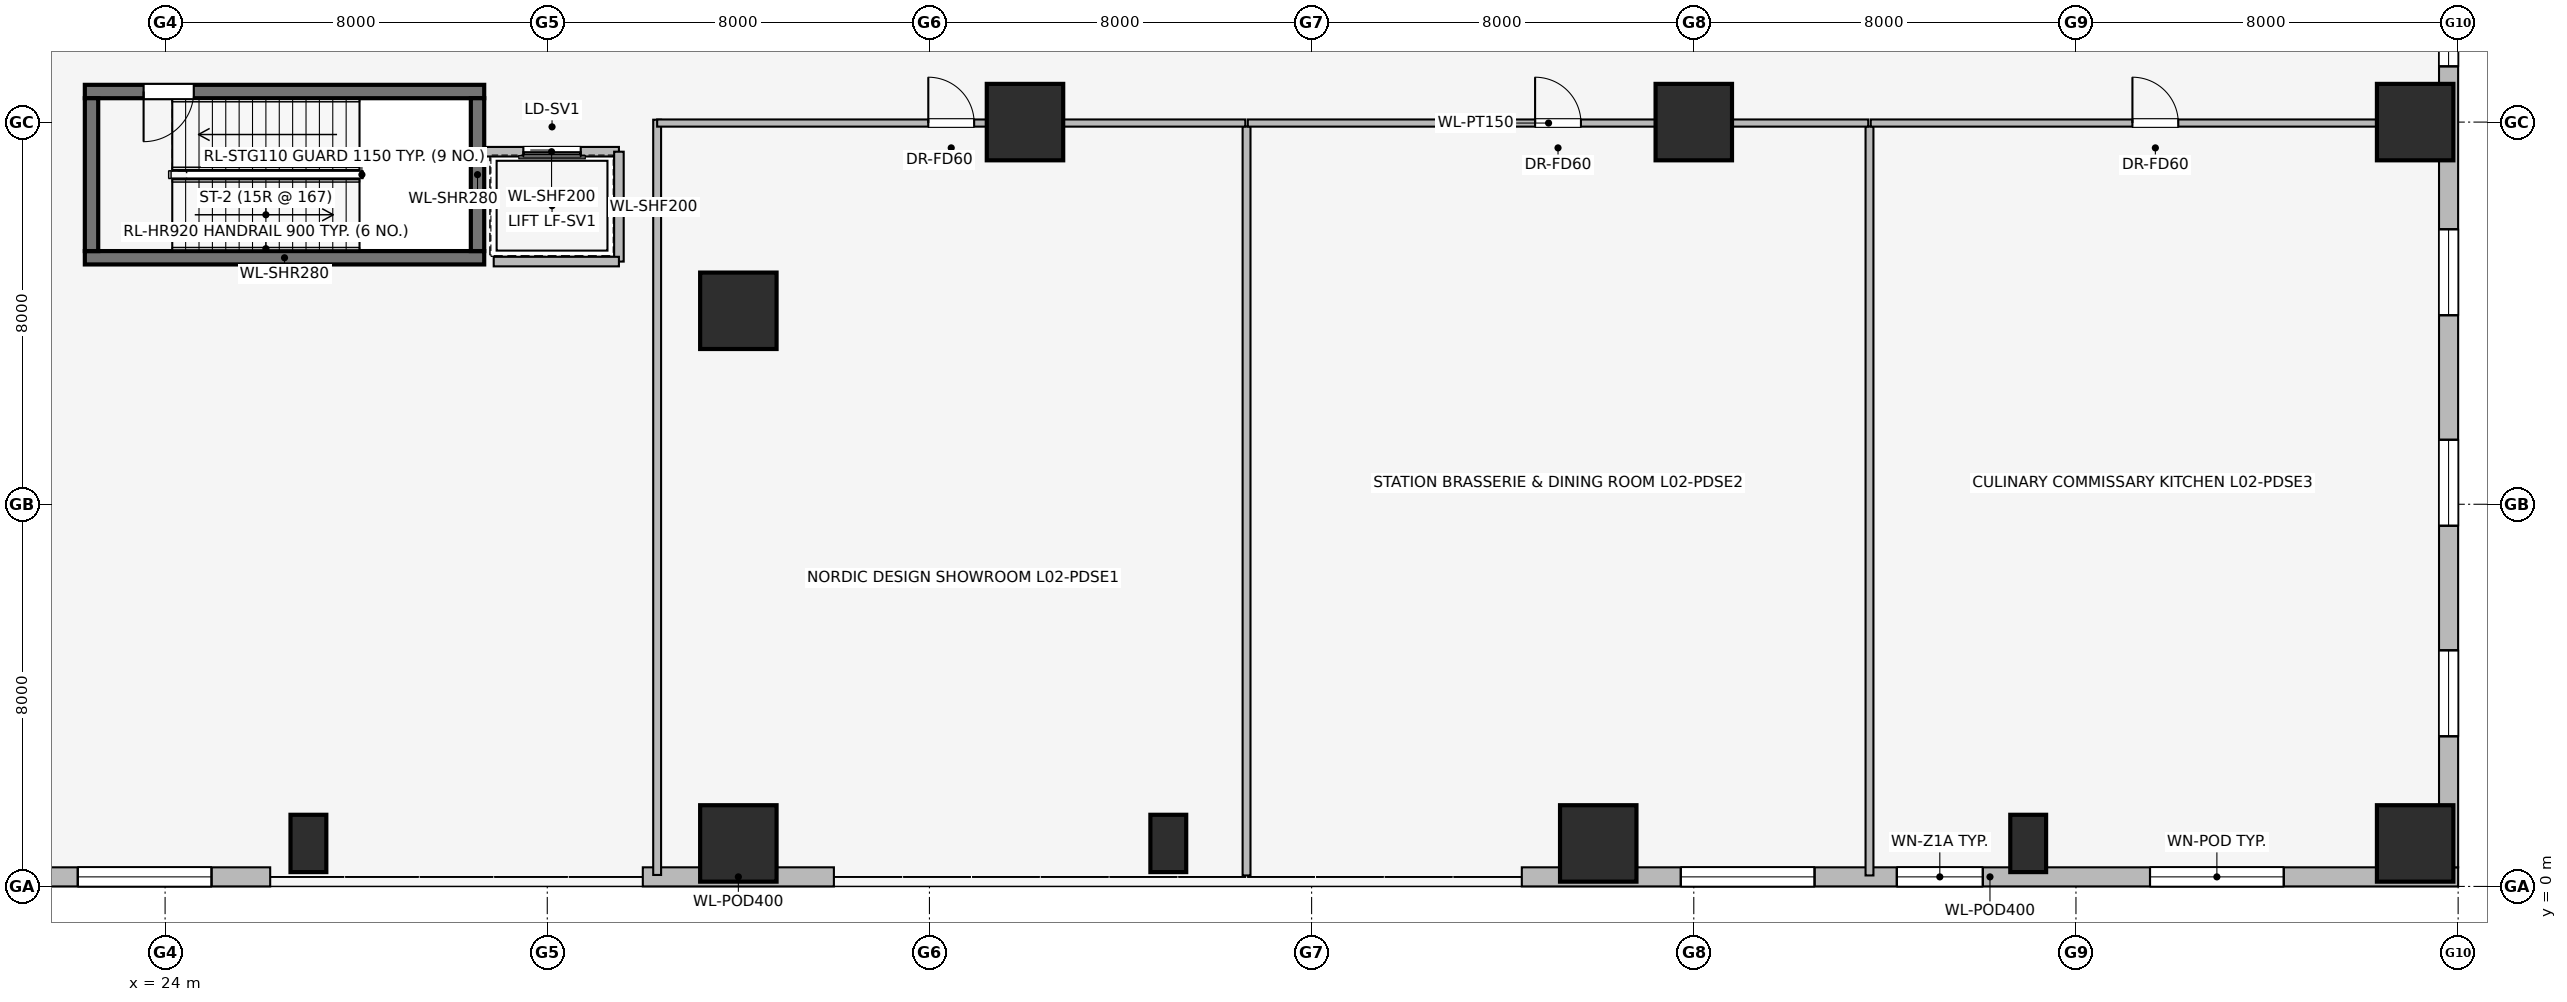
"""IFC4 building model, lengths in metres.
Left out: names, types, materials, properties, quantities, classifications, styles, units other than length and angle.
Written with IfcOpenShell. Run it as: python <this file> out.ifc"""

import sys

from ifc_helpers import new_model, si_unit, direction, frame, frame_2d, origin, origin_2d, place, context, subcontext, project, spatial, rectangle, extrude, element, fill, save


model = new_model("IFC4")
c1 = context("Model", 3, precision=1e-05, world=origin(), true_north=direction((0.0, 1.0)))
c2 = subcontext(c1, "Body", "Model", "MODEL_VIEW")
j1 = project(units=[si_unit("LENGTHUNIT", "METRE"), si_unit("PLANEANGLEUNIT", "RADIAN")], contexts=[c1])
p1 = place(None, origin())
s1 = spatial("IfcSite", under=j1, at=p1, CompositionType="ELEMENT")
p2 = place(p1, origin())
s2 = spatial("IfcBuilding", under=s1, at=p2, CompositionType="ELEMENT")
p3 = place(p2, frame((0.0, 0.0, 6.0)))
s3 = spatial("IfcBuildingStorey", under=s2, at=p3, CompositionType="ELEMENT", Elevation=6.0)
p4 = place(p3, frame((22.32, 13.16, 0.0), z_axis=(0.0, 0.0, 1.0), x_axis=(1.0, 0.0, 0.0)))
e1 = element("IfcWall", 1, at=p4, inside=s3, PredefinedType="SHEAR", context=c2, shape_type="SweptSolid", body=[
    extrude(rectangle(XDim=8.36, YDim=0.28, at=frame_2d((4.18, 0.0))), origin(), (0.0, 0.0, 1.0), 5.0),
])
p5 = place(p3, frame((30.68, 16.64, 0.0), z_axis=(0.0, 0.0, 1.0), x_axis=(-1.0, 0.0, 0.0)))
e2 = element("IfcWall", 2, at=p5, inside=s3, PredefinedType="SHEAR", context=c2, shape_type="SweptSolid", body=[
    extrude(rectangle(XDim=8.36, YDim=0.28, at=frame_2d((4.18, 0.0))), origin(), (0.0, 0.0, 1.0), 5.0),
])
p6 = place(p5, frame((6.08, 0.0, 0.0)))
e3 = element("IfcOpeningElement", 3, at=p6, cuts=e2, PredefinedType="OPENING", context=c2, shape_type="SweptSolid", body=[
    extrude(rectangle(XDim=1.05, YDim=2.0, at=frame_2d((0.525, 1.0))), frame((0.0, 0.15, 0.0), z_axis=(0.0, -1.0, 0.0), x_axis=(1.0, 0.0, 0.0)), (0.0, 0.0, 1.0), 0.3),
])
for number, where, z_axis, x_axis in (
    (4, (22.46, 16.5, 0.0), (0.0, 0.0, 1.0), (0.0, -1.0, 0.0)),
    (5, (30.54, 13.3, 0.0), (0.0, 0.0, 1.0), (0.0, 1.0, 0.0)),
):
    element("IfcWall", number, at=place(p3, frame(where, z_axis=z_axis, x_axis=x_axis)), inside=s3, PredefinedType="SHEAR", context=c2, shape_type="SweptSolid", body=[
        extrude(rectangle(XDim=3.2, YDim=0.28, at=frame_2d((1.6, 0.0))), origin(), (0.0, 0.0, 1.0), 5.0),
    ])
for number, where, z_axis, x_axis in (
    (6, (71.1, 0.9, 0.0), (0.0, 0.0, 1.0), (1.0, 0.0, 0.0)),
    (7, (36.0, 0.9, 0.0), (0.0, 0.0, 1.0), (1.0, 0.0, 0.0)),
    (8, (54.0, 0.9, 0.0), (0.0, 0.0, 1.0), (1.0, 0.0, 0.0)),
    (9, (71.1, 16.0, 0.0), (0.0, 0.0, 1.0), (1.0, 0.0, 0.0)),
    (10, (42.0, 16.0, 0.0), (0.0, 0.0, 1.0), (1.0, 0.0, 0.0)),
    (11, (56.0, 16.0, 0.0), (0.0, 0.0, 1.0), (1.0, 0.0, 0.0)),
    (12, (36.0, 12.05, 0.0), (0.0, 0.0, 1.0), (1.0, 0.0, 0.0)),
):
    element("IfcColumn", number, at=place(p3, frame(where, z_axis=z_axis, x_axis=x_axis)), inside=s3, PredefinedType="COLUMN", context=c2, shape_type="SweptSolid", body=[
        extrude(rectangle(XDim=1.6, YDim=1.6, at=origin_2d()), origin(), (0.0, 0.0, 1.0), 5.0),
    ])
for number, where, z_axis, x_axis in (
    (13, (27.0, 0.9, 0.0), (0.0, 0.0, 1.0), (1.0, 0.0, 0.0)),
    (14, (45.0, 0.9, 0.0), (0.0, 0.0, 1.0), (1.0, 0.0, 0.0)),
    (15, (63.0, 0.9, 0.0), (0.0, 0.0, 1.0), (1.0, 0.0, 0.0)),
):
    element("IfcColumn", number, at=place(p3, frame(where, z_axis=z_axis, x_axis=x_axis)), inside=s3, PredefinedType="PILASTER", context=c2, shape_type="SweptSolid", body=[
        extrude(rectangle(XDim=0.75, YDim=1.2, at=origin_2d()), origin(), (0.0, 0.0, 1.0), 5.0),
    ])
p7 = place(p3, frame((72.0, 0.2, 0.0), z_axis=(0.0, 0.0, 1.0), x_axis=(-1.0, 0.0, 0.0)))
e16 = element("IfcWall", 16, at=p7, inside=s3, PredefinedType="STANDARD", context=c2, shape_type="SweptSolid", body=[
    extrude(rectangle(XDim=19.6, YDim=0.4, at=frame_2d((9.8, 0.0))), origin(), (0.0, 0.0, 1.0), 4.69),
])
p8 = place(p7, frame((3.65, 0.0, 0.75)))
e17 = element("IfcOpeningElement", 17, at=p8, cuts=e16, PredefinedType="OPENING", context=c2, shape_type="SweptSolid", body=[
    extrude(rectangle(XDim=2.8, YDim=1.8, at=frame_2d((1.4, 0.9))), frame((0.0, 0.21, 0.0), z_axis=(0.0, -1.0, 0.0), x_axis=(1.0, 0.0, 0.0)), (0.0, 0.0, 1.0), 0.42),
])
p9 = place(p7, frame((9.95, 0.0, 0.75)))
e18 = element("IfcOpeningElement", 18, at=p9, cuts=e16, PredefinedType="OPENING", context=c2, shape_type="SweptSolid", body=[
    extrude(rectangle(XDim=1.8, YDim=1.5, at=frame_2d((0.9, 0.75))), frame((0.0, 0.21, 0.0), z_axis=(0.0, -1.0, 0.0), x_axis=(1.0, 0.0, 0.0)), (0.0, 0.0, 1.0), 0.42),
])
p10 = place(p7, frame((13.472, 0.0, 0.75)))
e19 = element("IfcOpeningElement", 19, at=p10, cuts=e16, PredefinedType="OPENING", context=c2, shape_type="SweptSolid", body=[
    extrude(rectangle(XDim=2.8, YDim=1.8, at=frame_2d((1.4, 0.9))), frame((0.0, 0.21, 0.0), z_axis=(0.0, -1.0, 0.0), x_axis=(1.0, 0.0, 0.0)), (0.0, 0.0, 1.0), 0.42),
])
p11 = place(p3, frame((38.0, 0.2, 0.0), z_axis=(0.0, 0.0, 1.0), x_axis=(-1.0, 0.0, 0.0)))
e20 = element("IfcWall", 20, at=p11, inside=s3, PredefinedType="STANDARD", context=c2, shape_type="SweptSolid", body=[
    extrude(rectangle(XDim=4.0, YDim=0.4, at=frame_2d((2.0, 0.0))), origin(), (0.0, 0.0, 1.0), 4.69),
])
p12 = place(p3, frame((26.2, 0.2, 0.0), z_axis=(0.0, 0.0, 1.0), x_axis=(-1.0, 0.0, 0.0)))
e21 = element("IfcWall", 21, at=p12, inside=s3, PredefinedType="STANDARD", context=c2, shape_type="SweptSolid", body=[
    extrude(rectangle(XDim=26.2, YDim=0.4, at=frame_2d((13.1, 0.0))), origin(), (0.0, 0.0, 1.0), 4.69),
])
p13 = place(p12, frame((1.228, 0.0, 0.75)))
e22 = element("IfcOpeningElement", 22, at=p13, cuts=e21, PredefinedType="OPENING", context=c2, shape_type="SweptSolid", body=[
    extrude(rectangle(XDim=2.8, YDim=1.8, at=frame_2d((1.4, 0.9))), frame((0.0, 0.21, 0.0), z_axis=(0.0, -1.0, 0.0), x_axis=(1.0, 0.0, 0.0)), (0.0, 0.0, 1.0), 0.42),
])
p14 = place(p12, frame((5.383, 0.0, 0.75)))
e23 = element("IfcOpeningElement", 23, at=p14, cuts=e21, PredefinedType="OPENING", context=c2, shape_type="SweptSolid", body=[
    extrude(rectangle(XDim=2.8, YDim=1.8, at=frame_2d((1.4, 0.9))), frame((0.0, 0.21, 0.0), z_axis=(0.0, -1.0, 0.0), x_axis=(1.0, 0.0, 0.0)), (0.0, 0.0, 1.0), 0.42),
])
p15 = place(p12, frame((11.27, 0.0, 0.75)))
e24 = element("IfcOpeningElement", 24, at=p15, cuts=e21, PredefinedType="OPENING", context=c2, shape_type="SweptSolid", body=[
    extrude(rectangle(XDim=1.8, YDim=1.5, at=frame_2d((0.9, 0.75))), frame((0.0, 0.21, 0.0), z_axis=(0.0, -1.0, 0.0), x_axis=(1.0, 0.0, 0.0)), (0.0, 0.0, 1.0), 0.42),
])
p16 = place(p12, frame((14.13, 0.0, 0.75)))
e25 = element("IfcOpeningElement", 25, at=p16, cuts=e21, PredefinedType="OPENING", context=c2, shape_type="SweptSolid", body=[
    extrude(rectangle(XDim=1.8, YDim=1.5, at=frame_2d((0.9, 0.75))), frame((0.0, 0.21, 0.0), z_axis=(0.0, -1.0, 0.0), x_axis=(1.0, 0.0, 0.0)), (0.0, 0.0, 1.0), 0.42),
])
p17 = place(p12, frame((19.75, 0.0, 0.75)))
e26 = element("IfcOpeningElement", 26, at=p17, cuts=e21, PredefinedType="OPENING", context=c2, shape_type="SweptSolid", body=[
    extrude(rectangle(XDim=2.8, YDim=1.8, at=frame_2d((1.4, 0.9))), frame((0.0, 0.21, 0.0), z_axis=(0.0, -1.0, 0.0), x_axis=(1.0, 0.0, 0.0)), (0.0, 0.0, 1.0), 0.42),
])
p18 = place(p3, frame((71.8, 24.0, 0.0), z_axis=(0.0, 0.0, 1.0), x_axis=(0.0, -1.0, 0.0)))
e27 = element("IfcWall", 27, at=p18, inside=s3, PredefinedType="STANDARD", context=c2, shape_type="SweptSolid", body=[
    extrude(rectangle(XDim=23.6, YDim=0.4, at=frame_2d((11.8, 0.0))), origin(), (0.0, 0.0, 1.0), 4.69),
])
p19 = place(p18, frame((0.778, 0.0, 0.75)))
e28 = element("IfcOpeningElement", 28, at=p19, cuts=e27, PredefinedType="OPENING", context=c2, shape_type="SweptSolid", body=[
    extrude(rectangle(XDim=2.8, YDim=1.8, at=frame_2d((1.4, 0.9))), frame((0.0, 0.21, 0.0), z_axis=(0.0, -1.0, 0.0), x_axis=(1.0, 0.0, 0.0)), (0.0, 0.0, 1.0), 0.42),
])
p20 = place(p18, frame((4.033, 0.0, 0.75)))
e29 = element("IfcOpeningElement", 29, at=p20, cuts=e27, PredefinedType="OPENING", context=c2, shape_type="SweptSolid", body=[
    extrude(rectangle(XDim=2.8, YDim=1.8, at=frame_2d((1.4, 0.9))), frame((0.0, 0.21, 0.0), z_axis=(0.0, -1.0, 0.0), x_axis=(1.0, 0.0, 0.0)), (0.0, 0.0, 1.0), 0.42),
])
p21 = place(p18, frame((10.243, 0.0, 0.75)))
e30 = element("IfcOpeningElement", 30, at=p21, cuts=e27, PredefinedType="OPENING", context=c2, shape_type="SweptSolid", body=[
    extrude(rectangle(XDim=1.8, YDim=1.5, at=frame_2d((0.9, 0.75))), frame((0.0, 0.21, 0.0), z_axis=(0.0, -1.0, 0.0), x_axis=(1.0, 0.0, 0.0)), (0.0, 0.0, 1.0), 0.42),
])
p22 = place(p18, frame((14.65, 0.0, 0.75)))
e31 = element("IfcOpeningElement", 31, at=p22, cuts=e27, PredefinedType="OPENING", context=c2, shape_type="SweptSolid", body=[
    extrude(rectangle(XDim=1.8, YDim=1.5, at=frame_2d((0.9, 0.75))), frame((0.0, 0.21, 0.0), z_axis=(0.0, -1.0, 0.0), x_axis=(1.0, 0.0, 0.0)), (0.0, 0.0, 1.0), 0.42),
])
p23 = place(p18, frame((19.057, 0.0, 0.75)))
e32 = element("IfcOpeningElement", 32, at=p23, cuts=e27, PredefinedType="OPENING", context=c2, shape_type="SweptSolid", body=[
    extrude(rectangle(XDim=1.8, YDim=1.5, at=frame_2d((0.9, 0.75))), frame((0.0, 0.21, 0.0), z_axis=(0.0, -1.0, 0.0), x_axis=(1.0, 0.0, 0.0)), (0.0, 0.0, 1.0), 0.42),
])
p24 = place(p3, frame((33.5, 15.38, 0.0), z_axis=(0.0, 0.0, 1.0), x_axis=(-1.0, 0.0, 0.0)))
e33 = element("IfcWall", 33, at=p24, inside=s3, PredefinedType="PARTITIONING", context=c2, shape_type="SweptSolid", body=[
    extrude(rectangle(XDim=2.82, YDim=0.2, at=frame_2d((1.41, 0.0))), origin(), (0.0, 0.0, 1.0), 4.69),
])
p25 = place(p24, frame((0.8, 0.0, 0.0)))
e34 = element("IfcOpeningElement", 34, at=p25, cuts=e33, PredefinedType="OPENING", context=c2, shape_type="SweptSolid", body=[
    extrude(rectangle(XDim=1.2, YDim=2.2, at=frame_2d((0.6, 1.1))), frame((0.0, 0.11, 0.0), z_axis=(0.0, -1.0, 0.0), x_axis=(1.0, 0.0, 0.0)), (0.0, 0.0, 1.0), 0.22),
])
p26 = place(p3, frame((33.5, 13.08, 0.0), z_axis=(0.0, 0.0, 1.0), x_axis=(0.0, 1.0, 0.0)))
e35 = element("IfcWall", 35, at=p26, inside=s3, PredefinedType="PARTITIONING", context=c2, shape_type="SweptSolid", body=[
    extrude(rectangle(XDim=2.3, YDim=0.2, at=frame_2d((1.15, 0.0))), origin(), (0.0, 0.0, 1.0), 4.69),
])
p27 = place(p3, frame((30.879, 13.08, 0.0), z_axis=(0.0, 0.0, 1.0), x_axis=(1.0, 0.0, 0.0)))
e36 = element("IfcWall", 36, at=p27, inside=s3, PredefinedType="PARTITIONING", context=c2, shape_type="SweptSolid", body=[
    extrude(rectangle(XDim=2.621, YDim=0.2, at=frame_2d((1.311, 0.0))), origin(), (0.0, 0.0, 1.0), 4.69),
])
p28 = place(p3, frame((34.3, 0.24, 0.0), z_axis=(0.0, 0.0, 1.0), x_axis=(0.0, 1.0, 0.0)))
e37 = element("IfcWall", 37, at=p28, inside=s3, PredefinedType="PARTITIONING", context=c2, shape_type="SweptSolid", body=[
    extrude(rectangle(XDim=15.81, YDim=0.165, at=frame_2d((7.905, 0.0))), origin(), (0.0, 0.0, 1.0), 4.69),
])
p29 = place(p3, frame((46.638, 0.23, 0.0), z_axis=(0.0, 0.0, 1.0), x_axis=(0.0, 1.0, 0.0)))
e38 = element("IfcWall", 38, at=p29, inside=s3, PredefinedType="PARTITIONING", context=c2, shape_type="SweptSolid", body=[
    extrude(rectangle(XDim=15.68, YDim=0.165, at=frame_2d((7.84, 0.0))), origin(), (0.0, 0.0, 1.0), 4.082),
])
p30 = place(p3, frame((59.678, 0.23, 0.0), z_axis=(0.0, 0.0, 1.0), x_axis=(0.0, 1.0, 0.0)))
e39 = element("IfcWall", 39, at=p30, inside=s3, PredefinedType="PARTITIONING", context=c2, shape_type="SweptSolid", body=[
    extrude(rectangle(XDim=15.68, YDim=0.165, at=frame_2d((7.84, 0.0))), origin(), (0.0, 0.0, 1.0), 4.69),
])
p31 = place(p3, frame((34.3, 15.98, 0.0), z_axis=(0.0, 0.0, 1.0), x_axis=(1.0, 0.0, 0.0)))
e40 = element("IfcWall", 40, at=p31, inside=s3, PredefinedType="PARTITIONING", context=c2, shape_type="SweptSolid", body=[
    extrude(rectangle(XDim=12.312, YDim=0.15, at=frame_2d((6.156, 0.0))), origin(), (0.0, 0.0, 1.0), 3.742),
])
p32 = place(p31, frame((5.676, 0.0, 0.0)))
e41 = element("IfcOpeningElement", 41, at=p32, cuts=e40, PredefinedType="OPENING", context=c2, shape_type="SweptSolid", body=[
    extrude(rectangle(XDim=0.96, YDim=2.0, at=frame_2d((0.48, 1.0))), frame((0.0, 0.085, 0.0), z_axis=(0.0, -1.0, 0.0), x_axis=(1.0, 0.0, 0.0)), (0.0, 0.0, 1.0), 0.17),
])
p33 = place(p3, frame((46.664, 15.98, 0.0), z_axis=(0.0, 0.0, 1.0), x_axis=(1.0, 0.0, 0.0)))
e42 = element("IfcWall", 42, at=p33, inside=s3, PredefinedType="PARTITIONING", context=c2, shape_type="SweptSolid", body=[
    extrude(rectangle(XDim=12.988, YDim=0.15, at=frame_2d((6.494, 0.0))), origin(), (0.0, 0.0, 1.0), 3.742),
])
p34 = place(p33, frame((6.014, 0.0, 0.0)))
e43 = element("IfcOpeningElement", 43, at=p34, cuts=e42, PredefinedType="OPENING", context=c2, shape_type="SweptSolid", body=[
    extrude(rectangle(XDim=0.96, YDim=2.0, at=frame_2d((0.48, 1.0))), frame((0.0, 0.085, 0.0), z_axis=(0.0, -1.0, 0.0), x_axis=(1.0, 0.0, 0.0)), (0.0, 0.0, 1.0), 0.17),
])
p35 = place(p3, frame((59.704, 15.98, 0.0), z_axis=(0.0, 0.0, 1.0), x_axis=(1.0, 0.0, 0.0)))
e44 = element("IfcWall", 44, at=p35, inside=s3, PredefinedType="PARTITIONING", context=c2, shape_type="SweptSolid", body=[
    extrude(rectangle(XDim=11.916, YDim=0.15, at=frame_2d((5.958, 0.0))), origin(), (0.0, 0.0, 1.0), 3.742),
])
p36 = place(p35, frame((5.478, 0.0, 0.0)))
e45 = element("IfcOpeningElement", 45, at=p36, cuts=e44, PredefinedType="OPENING", context=c2, shape_type="SweptSolid", body=[
    extrude(rectangle(XDim=0.96, YDim=2.0, at=frame_2d((0.48, 1.0))), frame((0.0, 0.085, 0.0), z_axis=(0.0, -1.0, 0.0), x_axis=(1.0, 0.0, 0.0)), (0.0, 0.0, 1.0), 0.17),
])
p37 = place(p8, origin())
e46 = element("IfcWindow", 46, at=p37, inside=s3, PartitioningType="SINGLE_PANEL", PredefinedType="WINDOW", context=c2, shape_type="SweptSolid", body=[
    extrude(rectangle(XDim=2.8, YDim=1.8, at=frame_2d((1.4, 0.9))), frame((0.0, 0.03, 0.0), z_axis=(0.0, -1.0, 0.0), x_axis=(1.0, 0.0, 0.0)), (0.0, 0.0, 1.0), 0.06),
])
fill(e17, e46)
p38 = place(p9, origin())
e47 = element("IfcWindow", 47, at=p38, inside=s3, PartitioningType="SINGLE_PANEL", PredefinedType="WINDOW", context=c2, shape_type="SweptSolid", body=[
    extrude(rectangle(XDim=1.8, YDim=1.5, at=frame_2d((0.9, 0.75))), frame((0.0, 0.03, 0.0), z_axis=(0.0, -1.0, 0.0), x_axis=(1.0, 0.0, 0.0)), (0.0, 0.0, 1.0), 0.06),
])
fill(e18, e47)
p39 = place(p10, origin())
e48 = element("IfcWindow", 48, at=p39, inside=s3, PartitioningType="SINGLE_PANEL", PredefinedType="WINDOW", context=c2, shape_type="SweptSolid", body=[
    extrude(rectangle(XDim=2.8, YDim=1.8, at=frame_2d((1.4, 0.9))), frame((0.0, 0.03, 0.0), z_axis=(0.0, -1.0, 0.0), x_axis=(1.0, 0.0, 0.0)), (0.0, 0.0, 1.0), 0.06),
])
fill(e19, e48)
p40 = place(p13, origin())
e49 = element("IfcWindow", 49, at=p40, inside=s3, PartitioningType="SINGLE_PANEL", PredefinedType="WINDOW", context=c2, shape_type="SweptSolid", body=[
    extrude(rectangle(XDim=2.8, YDim=1.8, at=frame_2d((1.4, 0.9))), frame((0.0, 0.03, 0.0), z_axis=(0.0, -1.0, 0.0), x_axis=(1.0, 0.0, 0.0)), (0.0, 0.0, 1.0), 0.06),
])
fill(e22, e49)
p41 = place(p20, origin())
e50 = element("IfcWindow", 50, at=p41, inside=s3, PartitioningType="SINGLE_PANEL", PredefinedType="WINDOW", context=c2, shape_type="SweptSolid", body=[
    extrude(rectangle(XDim=2.8, YDim=1.8, at=frame_2d((1.4, 0.9))), frame((0.0, 0.03, 0.0), z_axis=(0.0, -1.0, 0.0), x_axis=(1.0, 0.0, 0.0)), (0.0, 0.0, 1.0), 0.06),
])
fill(e29, e50)
p42 = place(p21, origin())
e51 = element("IfcWindow", 51, at=p42, inside=s3, PartitioningType="SINGLE_PANEL", PredefinedType="WINDOW", context=c2, shape_type="SweptSolid", body=[
    extrude(rectangle(XDim=1.8, YDim=1.5, at=frame_2d((0.9, 0.75))), frame((0.0, 0.03, 0.0), z_axis=(0.0, -1.0, 0.0), x_axis=(1.0, 0.0, 0.0)), (0.0, 0.0, 1.0), 0.06),
])
fill(e30, e51)
p43 = place(p22, origin())
e52 = element("IfcWindow", 52, at=p43, inside=s3, PartitioningType="SINGLE_PANEL", PredefinedType="WINDOW", context=c2, shape_type="SweptSolid", body=[
    extrude(rectangle(XDim=1.8, YDim=1.5, at=frame_2d((0.9, 0.75))), frame((0.0, 0.03, 0.0), z_axis=(0.0, -1.0, 0.0), x_axis=(1.0, 0.0, 0.0)), (0.0, 0.0, 1.0), 0.06),
])
fill(e31, e52)
p44 = place(p23, origin())
e53 = element("IfcWindow", 53, at=p44, inside=s3, PartitioningType="SINGLE_PANEL", PredefinedType="WINDOW", context=c2, shape_type="SweptSolid", body=[
    extrude(rectangle(XDim=1.8, YDim=1.5, at=frame_2d((0.9, 0.75))), frame((0.0, 0.03, 0.0), z_axis=(0.0, -1.0, 0.0), x_axis=(1.0, 0.0, 0.0)), (0.0, 0.0, 1.0), 0.06),
])
fill(e32, e53)
p45 = place(p6, origin())
e54 = element("IfcDoor", 54, at=p45, inside=s3, OperationType="SINGLE_SWING_RIGHT", PredefinedType="DOOR", context=c2, shape_type="SweptSolid", body=[
    extrude(rectangle(XDim=1.05, YDim=2.0, at=frame_2d((0.525, 1.0))), frame((0.0, 0.025, 0.0), z_axis=(0.0, -1.0, 0.0), x_axis=(1.0, 0.0, 0.0)), (0.0, 0.0, 1.0), 0.05),
])
fill(e3, e54)
p46 = place(p25, origin())
e55 = element("IfcDoor", 55, at=p46, inside=s3, OperationType="SLIDING_TO_RIGHT", PredefinedType="DOOR", context=c2, shape_type="SweptSolid", body=[
    extrude(rectangle(XDim=1.2, YDim=2.2, at=frame_2d((0.6, 1.1))), frame((0.0, 0.025, 0.0), z_axis=(0.0, -1.0, 0.0), x_axis=(1.0, 0.0, 0.0)), (0.0, 0.0, 1.0), 0.05),
])
fill(e34, e55)
p47 = place(p32, origin())
e56 = element("IfcDoor", 56, at=p47, inside=s3, OperationType="SINGLE_SWING_LEFT", PredefinedType="DOOR", context=c2, shape_type="SweptSolid", body=[
    extrude(rectangle(XDim=0.96, YDim=2.0, at=frame_2d((0.48, 1.0))), frame((0.0, 0.025, 0.0), z_axis=(0.0, -1.0, 0.0), x_axis=(1.0, 0.0, 0.0)), (0.0, 0.0, 1.0), 0.05),
])
fill(e41, e56)
p48 = place(p34, origin())
e57 = element("IfcDoor", 57, at=p48, inside=s3, OperationType="SINGLE_SWING_LEFT", PredefinedType="DOOR", context=c2, shape_type="SweptSolid", body=[
    extrude(rectangle(XDim=0.96, YDim=2.0, at=frame_2d((0.48, 1.0))), frame((0.0, 0.025, 0.0), z_axis=(0.0, -1.0, 0.0), x_axis=(1.0, 0.0, 0.0)), (0.0, 0.0, 1.0), 0.05),
])
fill(e43, e57)
p49 = place(p36, origin())
e58 = element("IfcDoor", 58, at=p49, inside=s3, OperationType="SINGLE_SWING_LEFT", PredefinedType="DOOR", context=c2, shape_type="SweptSolid", body=[
    extrude(rectangle(XDim=0.96, YDim=2.0, at=frame_2d((0.48, 1.0))), frame((0.0, 0.025, 0.0), z_axis=(0.0, -1.0, 0.0), x_axis=(1.0, 0.0, 0.0)), (0.0, 0.0, 1.0), 0.05),
])
fill(e45, e58)
save(model, sys.argv[1])
